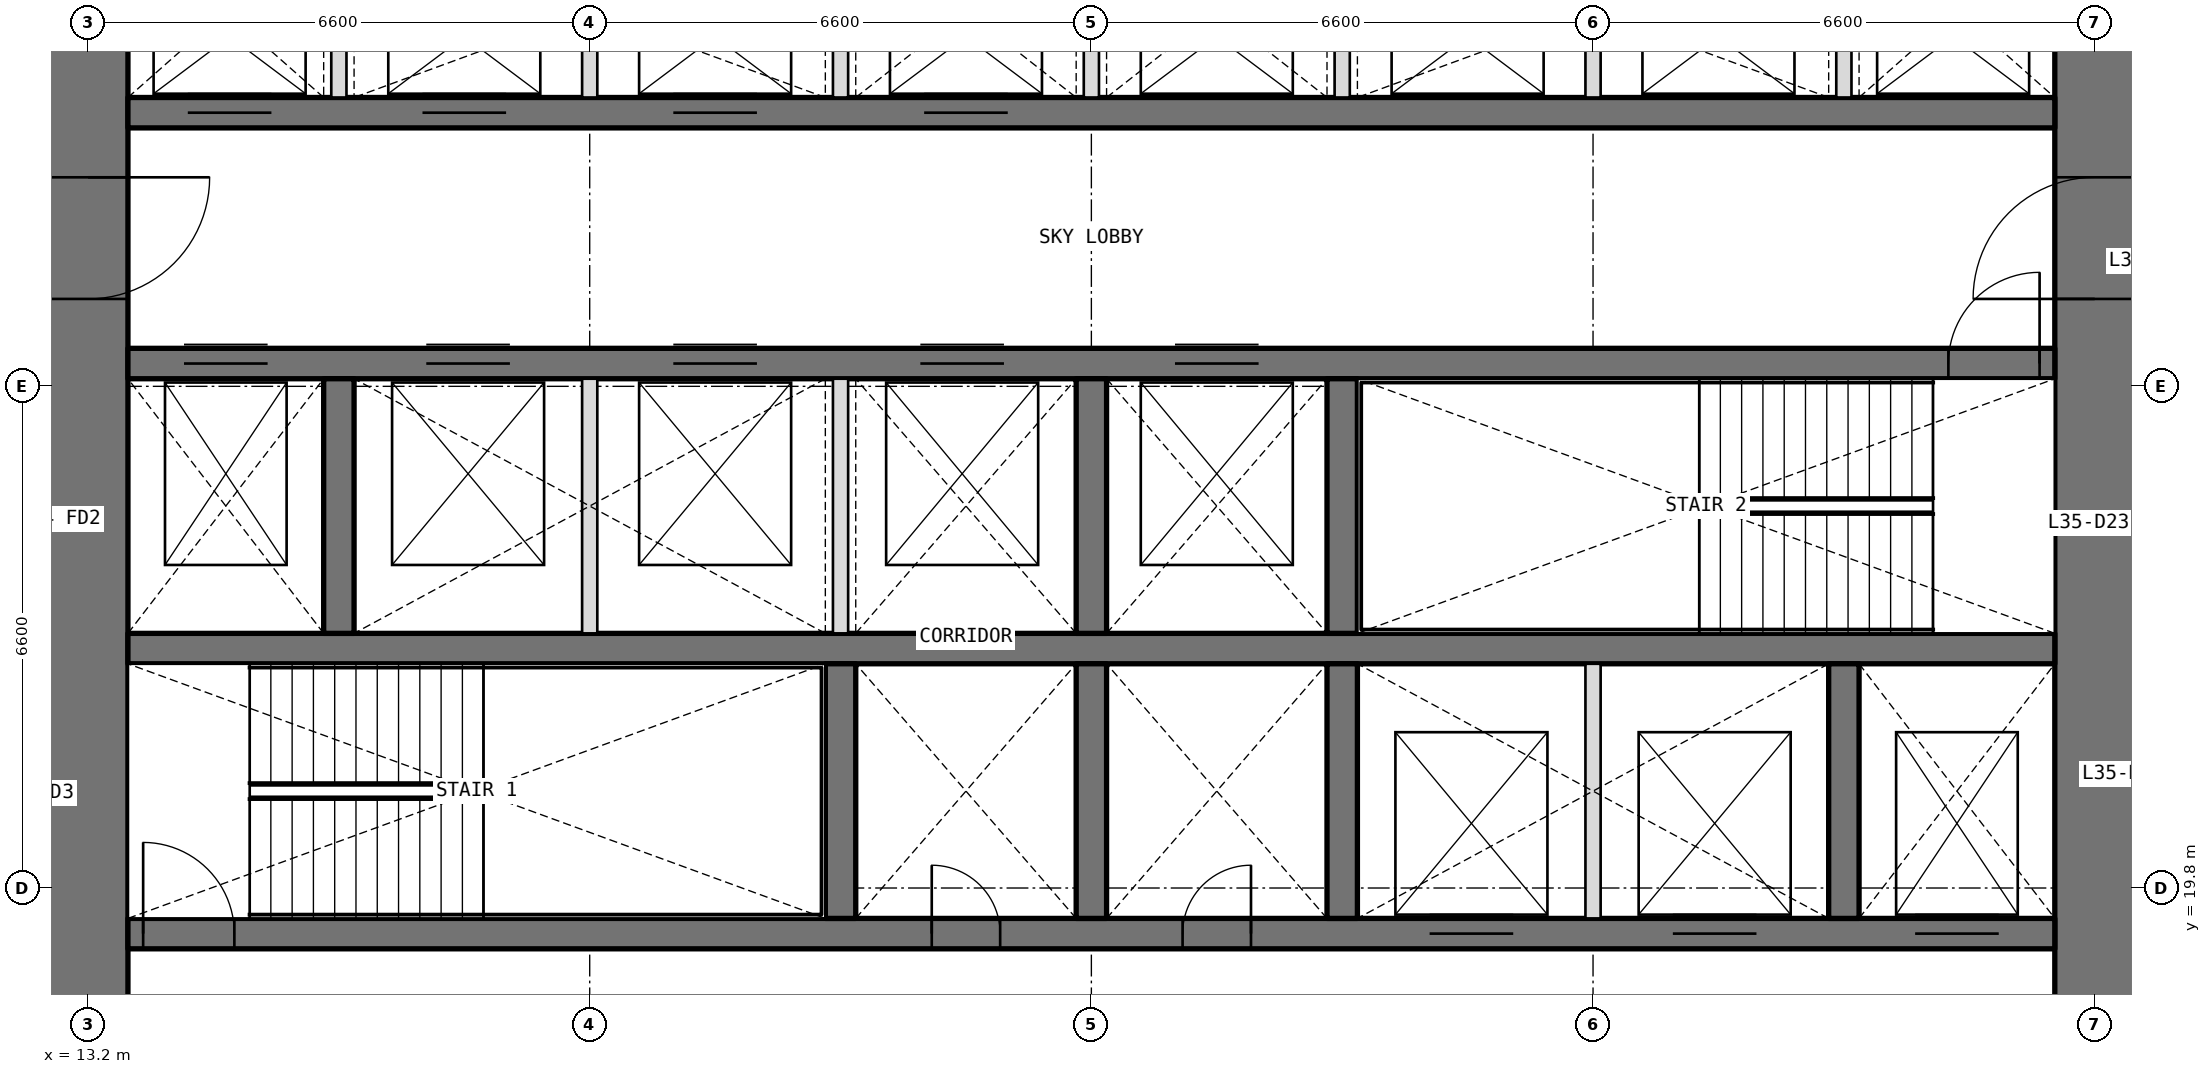
"""IFC4 building model, lengths in metres.
Left out: names, types, materials, properties, quantities, classifications, styles, units other than length and angle.
Written with IfcOpenShell. Run it as: python <this file> out.ifc"""

import sys

from ifc_helpers import new_model, si_unit, direction, frame, frame_2d, origin, place, context, subcontext, project, spatial, rectangle, extrude, element, fill, save


model = new_model("IFC4")
c1 = context("Model", 3, precision=1e-05, world=origin(), true_north=direction((0.0, 1.0)))
c2 = subcontext(c1, "Body", "Model", "MODEL_VIEW")
j1 = project(units=[si_unit("LENGTHUNIT", "METRE"), si_unit("PLANEANGLEUNIT", "RADIAN")], contexts=[c1])
p1 = place(None, origin())
s1 = spatial("IfcSite", under=j1, at=p1, CompositionType="ELEMENT")
p2 = place(p1, origin())
s2 = spatial("IfcBuilding", under=s1, at=p2, CompositionType="ELEMENT")
p3 = place(p2, frame((0.0, 0.0, 155.7)))
s3 = spatial("IfcBuildingStorey", under=s2, at=p3, CompositionType="ELEMENT", Elevation=155.7)
p4 = place(p3, frame((39.6, 13.725, 0.0), z_axis=(0.0, 0.0, 1.0), x_axis=(0.0, 1.0, 0.0)))
e1 = element("IfcWall", 1, at=p4, inside=s3, PredefinedType="SHEAR", context=c2, shape_type="SweptSolid", body=[
    extrude(rectangle(XDim=18.75, YDim=1.05, at=frame_2d((9.375, 0.0))), origin(), (0.0, 0.0, 1.0), 4.2),
])
p5 = place(p4, frame((3.025, 0.0, 0.0)))
e2 = element("IfcOpeningElement", 2, at=p5, cuts=e1, PredefinedType="OPENING", context=c2, shape_type="SweptSolid", body=[
    extrude(rectangle(XDim=1.6, YDim=2.1, at=frame_2d((0.8, 1.05))), frame((0.0, 0.535, 0.0), z_axis=(0.0, -1.0, 0.0), x_axis=(1.0, 0.0, 0.0)), (0.0, 0.0, 1.0), 1.07),
])
p6 = place(p4, frame((13.825, 0.0, 0.0)))
e3 = element("IfcOpeningElement", 3, at=p6, cuts=e1, PredefinedType="OPENING", context=c2, shape_type="SweptSolid", body=[
    extrude(rectangle(XDim=1.6, YDim=2.1, at=frame_2d((0.8, 1.05))), frame((0.0, 0.535, 0.0), z_axis=(0.0, -1.0, 0.0), x_axis=(1.0, 0.0, 0.0)), (0.0, 0.0, 1.0), 1.07),
])
p7 = place(p3, frame((13.2, 32.475, 0.0), z_axis=(0.0, 0.0, 1.0), x_axis=(0.0, -1.0, 0.0)))
e4 = element("IfcWall", 4, at=p7, inside=s3, PredefinedType="SHEAR", context=c2, shape_type="SweptSolid", body=[
    extrude(rectangle(XDim=18.75, YDim=1.05, at=frame_2d((9.375, 0.0))), origin(), (0.0, 0.0, 1.0), 4.2),
])
p8 = place(p7, frame((14.125, 0.0, 0.0)))
e5 = element("IfcOpeningElement", 5, at=p8, cuts=e4, PredefinedType="OPENING", context=c2, shape_type="SweptSolid", body=[
    extrude(rectangle(XDim=1.6, YDim=2.1, at=frame_2d((0.8, 1.05))), frame((0.0, 0.535, 0.0), z_axis=(0.0, -1.0, 0.0), x_axis=(1.0, 0.0, 0.0)), (0.0, 0.0, 1.0), 1.07),
])
p9 = place(p7, frame((3.325, 0.0, 0.0)))
e6 = element("IfcOpeningElement", 6, at=p9, cuts=e4, PredefinedType="OPENING", context=c2, shape_type="SweptSolid", body=[
    extrude(rectangle(XDim=1.6, YDim=2.1, at=frame_2d((0.8, 1.05))), frame((0.0, 0.535, 0.0), z_axis=(0.0, -1.0, 0.0), x_axis=(1.0, 0.0, 0.0)), (0.0, 0.0, 1.0), 1.07),
])
p10 = place(p3, frame((13.725, 19.2, 0.0), z_axis=(0.0, 0.0, 1.0), x_axis=(1.0, 0.0, 0.0)))
e7 = element("IfcWall", 7, at=p10, inside=s3, PredefinedType="SHEAR", context=c2, shape_type="SweptSolid", body=[
    extrude(rectangle(XDim=25.35, YDim=0.4, at=frame_2d((12.675, 0.0))), origin(), (0.0, 0.0, 1.0), 4.2),
])
p11 = place(p10, frame((10.575, 0.0, 0.0)))
e8 = element("IfcOpeningElement", 8, at=p11, cuts=e7, PredefinedType="OPENING", context=c2, shape_type="SweptSolid", body=[
    extrude(rectangle(XDim=0.9, YDim=2.1, at=frame_2d((0.45, 1.05))), frame((0.0, 0.21, 0.0), z_axis=(0.0, -1.0, 0.0), x_axis=(1.0, 0.0, 0.0)), (0.0, 0.0, 1.0), 0.42),
])
p12 = place(p10, frame((13.875, 0.0, 0.0)))
e9 = element("IfcOpeningElement", 9, at=p12, cuts=e7, PredefinedType="OPENING", context=c2, shape_type="SweptSolid", body=[
    extrude(rectangle(XDim=0.9, YDim=2.1, at=frame_2d((0.45, 1.05))), frame((0.0, 0.21, 0.0), z_axis=(0.0, -1.0, 0.0), x_axis=(1.0, 0.0, 0.0)), (0.0, 0.0, 1.0), 0.42),
])
p13 = place(p10, frame((0.2, 0.0, 0.0)))
e10 = element("IfcOpeningElement", 10, at=p13, cuts=e7, PredefinedType="OPENING", context=c2, shape_type="SweptSolid", body=[
    extrude(rectangle(XDim=1.2, YDim=2.1, at=frame_2d((0.6, 1.05))), frame((0.0, 0.21, 0.0), z_axis=(0.0, -1.0, 0.0), x_axis=(1.0, 0.0, 0.0)), (0.0, 0.0, 1.0), 0.42),
])
p14 = place(p10, frame((23.512, 0.0, 0.0)))
e11 = element("IfcOpeningElement", 11, at=p14, cuts=e7, PredefinedType="OPENING", context=c2, shape_type="SweptSolid", body=[
    extrude(rectangle(XDim=1.1, YDim=2.1, at=frame_2d((0.55, 1.05))), frame((0.0, 0.21, 0.0), z_axis=(0.0, -1.0, 0.0), x_axis=(1.0, 0.0, 0.0)), (0.0, 0.0, 1.0), 0.42),
])
p15 = place(p10, frame((17.125, 0.0, 0.0)))
e12 = element("IfcOpeningElement", 12, at=p15, cuts=e7, PredefinedType="OPENING", context=c2, shape_type="SweptSolid", body=[
    extrude(rectangle(XDim=1.1, YDim=2.1, at=frame_2d((0.55, 1.05))), frame((0.0, 0.21, 0.0), z_axis=(0.0, -1.0, 0.0), x_axis=(1.0, 0.0, 0.0)), (0.0, 0.0, 1.0), 0.42),
])
p16 = place(p10, frame((20.325, 0.0, 0.0)))
e13 = element("IfcOpeningElement", 13, at=p16, cuts=e7, PredefinedType="OPENING", context=c2, shape_type="SweptSolid", body=[
    extrude(rectangle(XDim=1.1, YDim=2.1, at=frame_2d((0.55, 1.05))), frame((0.0, 0.21, 0.0), z_axis=(0.0, -1.0, 0.0), x_axis=(1.0, 0.0, 0.0)), (0.0, 0.0, 1.0), 0.42),
])
p17 = place(p3, frame((13.725, 22.95, 0.0), z_axis=(0.0, 0.0, 1.0), x_axis=(1.0, 0.0, 0.0)))
e14 = element("IfcWall", 14, at=p17, inside=s3, PredefinedType="SHEAR", context=c2, shape_type="SweptSolid", body=[
    extrude(rectangle(XDim=25.35, YDim=0.4, at=frame_2d((12.675, 0.0))), origin(), (0.0, 0.0, 1.0), 4.2),
])
p18 = place(p3, frame((13.725, 26.7, 0.0), z_axis=(0.0, 0.0, 1.0), x_axis=(1.0, 0.0, 0.0)))
e15 = element("IfcWall", 15, at=p18, inside=s3, PredefinedType="SHEAR", context=c2, shape_type="SweptSolid", body=[
    extrude(rectangle(XDim=25.35, YDim=0.4, at=frame_2d((12.675, 0.0))), origin(), (0.0, 0.0, 1.0), 4.2),
])
p19 = place(p18, frame((23.95, 0.0, 0.0)))
e16 = element("IfcOpeningElement", 16, at=p19, cuts=e15, PredefinedType="OPENING", context=c2, shape_type="SweptSolid", body=[
    extrude(rectangle(XDim=1.2, YDim=2.1, at=frame_2d((0.6, 1.05))), frame((0.0, 0.21, 0.0), z_axis=(0.0, -1.0, 0.0), x_axis=(1.0, 0.0, 0.0)), (0.0, 0.0, 1.0), 0.42),
])
p20 = place(p18, frame((0.738, 0.0, 0.0)))
e17 = element("IfcOpeningElement", 17, at=p20, cuts=e15, PredefinedType="OPENING", context=c2, shape_type="SweptSolid", body=[
    extrude(rectangle(XDim=1.1, YDim=2.1, at=frame_2d((0.55, 1.05))), frame((0.0, 0.21, 0.0), z_axis=(0.0, -1.0, 0.0), x_axis=(1.0, 0.0, 0.0)), (0.0, 0.0, 1.0), 0.42),
])
p21 = place(p18, frame((3.925, 0.0, 0.0)))
e18 = element("IfcOpeningElement", 18, at=p21, cuts=e15, PredefinedType="OPENING", context=c2, shape_type="SweptSolid", body=[
    extrude(rectangle(XDim=1.1, YDim=2.1, at=frame_2d((0.55, 1.05))), frame((0.0, 0.21, 0.0), z_axis=(0.0, -1.0, 0.0), x_axis=(1.0, 0.0, 0.0)), (0.0, 0.0, 1.0), 0.42),
])
p22 = place(p18, frame((7.175, 0.0, 0.0)))
e19 = element("IfcOpeningElement", 19, at=p22, cuts=e15, PredefinedType="OPENING", context=c2, shape_type="SweptSolid", body=[
    extrude(rectangle(XDim=1.1, YDim=2.1, at=frame_2d((0.55, 1.05))), frame((0.0, 0.21, 0.0), z_axis=(0.0, -1.0, 0.0), x_axis=(1.0, 0.0, 0.0)), (0.0, 0.0, 1.0), 0.42),
])
p23 = place(p18, frame((10.425, 0.0, 0.0)))
e20 = element("IfcOpeningElement", 20, at=p23, cuts=e15, PredefinedType="OPENING", context=c2, shape_type="SweptSolid", body=[
    extrude(rectangle(XDim=1.1, YDim=2.1, at=frame_2d((0.55, 1.05))), frame((0.0, 0.21, 0.0), z_axis=(0.0, -1.0, 0.0), x_axis=(1.0, 0.0, 0.0)), (0.0, 0.0, 1.0), 0.42),
])
p24 = place(p18, frame((13.775, 0.0, 0.0)))
e21 = element("IfcOpeningElement", 21, at=p24, cuts=e15, PredefinedType="OPENING", context=c2, shape_type="SweptSolid", body=[
    extrude(rectangle(XDim=1.1, YDim=2.1, at=frame_2d((0.55, 1.05))), frame((0.0, 0.21, 0.0), z_axis=(0.0, -1.0, 0.0), x_axis=(1.0, 0.0, 0.0)), (0.0, 0.0, 1.0), 0.42),
])
p25 = place(p3, frame((13.725, 30.0, 0.0), z_axis=(0.0, 0.0, 1.0), x_axis=(1.0, 0.0, 0.0)))
e22 = element("IfcWall", 22, at=p25, inside=s3, PredefinedType="SHEAR", context=c2, shape_type="SweptSolid", body=[
    extrude(rectangle(XDim=25.35, YDim=0.4, at=frame_2d((12.675, 0.0))), origin(), (0.0, 0.0, 1.0), 4.2),
])
p26 = place(p25, frame((0.788, 0.0, 0.0)))
e23 = element("IfcOpeningElement", 23, at=p26, cuts=e22, PredefinedType="OPENING", context=c2, shape_type="SweptSolid", body=[
    extrude(rectangle(XDim=1.1, YDim=2.1, at=frame_2d((0.55, 1.05))), frame((0.0, 0.21, 0.0), z_axis=(0.0, -1.0, 0.0), x_axis=(1.0, 0.0, 0.0)), (0.0, 0.0, 1.0), 0.42),
])
p27 = place(p25, frame((3.875, 0.0, 0.0)))
e24 = element("IfcOpeningElement", 24, at=p27, cuts=e22, PredefinedType="OPENING", context=c2, shape_type="SweptSolid", body=[
    extrude(rectangle(XDim=1.1, YDim=2.1, at=frame_2d((0.55, 1.05))), frame((0.0, 0.21, 0.0), z_axis=(0.0, -1.0, 0.0), x_axis=(1.0, 0.0, 0.0)), (0.0, 0.0, 1.0), 0.42),
])
p28 = place(p25, frame((7.175, 0.0, 0.0)))
e25 = element("IfcOpeningElement", 25, at=p28, cuts=e22, PredefinedType="OPENING", context=c2, shape_type="SweptSolid", body=[
    extrude(rectangle(XDim=1.1, YDim=2.1, at=frame_2d((0.55, 1.05))), frame((0.0, 0.21, 0.0), z_axis=(0.0, -1.0, 0.0), x_axis=(1.0, 0.0, 0.0)), (0.0, 0.0, 1.0), 0.42),
])
p29 = place(p25, frame((10.475, 0.0, 0.0)))
e26 = element("IfcOpeningElement", 26, at=p29, cuts=e22, PredefinedType="OPENING", context=c2, shape_type="SweptSolid", body=[
    extrude(rectangle(XDim=1.1, YDim=2.1, at=frame_2d((0.55, 1.05))), frame((0.0, 0.21, 0.0), z_axis=(0.0, -1.0, 0.0), x_axis=(1.0, 0.0, 0.0)), (0.0, 0.0, 1.0), 0.42),
])
for number, where, z_axis, x_axis in (
    (27, (23.1, 19.4, 0.0), (0.0, 0.0, 1.0), (0.0, 1.0, 0.0)),
    (28, (26.4, 19.4, 0.0), (0.0, 0.0, 1.0), (0.0, 1.0, 0.0)),
    (29, (29.7, 19.4, 0.0), (0.0, 0.0, 1.0), (0.0, 1.0, 0.0)),
    (30, (36.3, 19.4, 0.0), (0.0, 0.0, 1.0), (0.0, 1.0, 0.0)),
    (31, (16.5, 23.15, 0.0), (0.0, 0.0, 1.0), (0.0, 1.0, 0.0)),
    (32, (26.4, 23.15, 0.0), (0.0, 0.0, 1.0), (0.0, 1.0, 0.0)),
    (33, (29.7, 23.15, 0.0), (0.0, 0.0, 1.0), (0.0, 1.0, 0.0)),
):
    element("IfcWall", number, at=place(p3, frame(where, z_axis=z_axis, x_axis=x_axis)), inside=s3, PredefinedType="SHEAR", context=c2, shape_type="SweptSolid", body=[
        extrude(rectangle(XDim=3.35, YDim=0.4, at=frame_2d((1.675, 0.0))), origin(), (0.0, 0.0, 1.0), 4.2),
    ])
for number, where, z_axis, x_axis in (
    (34, (16.5, 30.2, 0.0), (0.0, 0.0, 1.0), (0.0, 1.0, 0.0)),
    (35, (19.8, 30.2, 0.0), (0.0, 0.0, 1.0), (0.0, 1.0, 0.0)),
    (36, (23.1, 30.2, 0.0), (0.0, 0.0, 1.0), (0.0, 1.0, 0.0)),
    (37, (26.4, 30.2, 0.0), (0.0, 0.0, 1.0), (0.0, 1.0, 0.0)),
    (38, (29.7, 30.2, 0.0), (0.0, 0.0, 1.0), (0.0, 1.0, 0.0)),
    (39, (33.0, 30.2, 0.0), (0.0, 0.0, 1.0), (0.0, 1.0, 0.0)),
    (40, (36.3, 30.2, 0.0), (0.0, 0.0, 1.0), (0.0, 1.0, 0.0)),
):
    element("IfcWall", number, at=place(p3, frame(where, z_axis=z_axis, x_axis=x_axis)), inside=s3, PredefinedType="PARTITIONING", context=c2, shape_type="SweptSolid", body=[
        extrude(rectangle(XDim=2.275, YDim=0.2, at=frame_2d((1.138, 0.0))), origin(), (0.0, 0.0, 1.0), 4.2),
    ])
for number, where, z_axis, x_axis in (
    (41, (33.0, 19.4, 0.0), (0.0, 0.0, 1.0), (0.0, 1.0, 0.0)),
    (42, (19.8, 23.15, 0.0), (0.0, 0.0, 1.0), (0.0, 1.0, 0.0)),
    (43, (23.1, 23.15, 0.0), (0.0, 0.0, 1.0), (0.0, 1.0, 0.0)),
):
    element("IfcWall", number, at=place(p3, frame(where, z_axis=z_axis, x_axis=x_axis)), inside=s3, PredefinedType="PARTITIONING", context=c2, shape_type="SweptSolid", body=[
        extrude(rectangle(XDim=3.35, YDim=0.2, at=frame_2d((1.675, 0.0))), origin(), (0.0, 0.0, 1.0), 4.2),
    ])
p30 = place(p11, origin())
e44 = element("IfcDoor", 44, at=p30, inside=s3, OperationType="SINGLE_SWING_LEFT", PredefinedType="DOOR", context=c2, shape_type="SweptSolid", body=[
    extrude(rectangle(XDim=0.9, YDim=2.1, at=frame_2d((0.45, 1.05))), frame((0.0, 0.025, 0.0), z_axis=(0.0, -1.0, 0.0), x_axis=(1.0, 0.0, 0.0)), (0.0, 0.0, 1.0), 0.05),
])
fill(e8, e44)
p31 = place(p12, origin())
e45 = element("IfcDoor", 45, at=p31, inside=s3, OperationType="SINGLE_SWING_RIGHT", PredefinedType="DOOR", context=c2, shape_type="SweptSolid", body=[
    extrude(rectangle(XDim=0.9, YDim=2.1, at=frame_2d((0.45, 1.05))), frame((0.0, 0.025, 0.0), z_axis=(0.0, -1.0, 0.0), x_axis=(1.0, 0.0, 0.0)), (0.0, 0.0, 1.0), 0.05),
])
fill(e9, e45)
p32 = place(p13, origin())
e46 = element("IfcDoor", 46, at=p32, inside=s3, OperationType="SINGLE_SWING_LEFT", PredefinedType="DOOR", context=c2, shape_type="SweptSolid", body=[
    extrude(rectangle(XDim=1.2, YDim=2.1, at=frame_2d((0.6, 1.05))), frame((0.0, 0.025, 0.0), z_axis=(0.0, -1.0, 0.0), x_axis=(1.0, 0.0, 0.0)), (0.0, 0.0, 1.0), 0.05),
])
fill(e10, e46)
p33 = place(p19, origin())
e47 = element("IfcDoor", 47, at=p33, inside=s3, OperationType="SINGLE_SWING_RIGHT", PredefinedType="DOOR", context=c2, shape_type="SweptSolid", body=[
    extrude(rectangle(XDim=1.2, YDim=2.1, at=frame_2d((0.6, 1.05))), frame((0.0, 0.025, 0.0), z_axis=(0.0, -1.0, 0.0), x_axis=(1.0, 0.0, 0.0)), (0.0, 0.0, 1.0), 0.05),
])
fill(e16, e47)
p34 = place(p9, origin())
e48 = element("IfcDoor", 48, at=p34, inside=s3, OperationType="DOUBLE_DOOR_DOUBLE_SWING", PredefinedType="DOOR", context=c2, shape_type="SweptSolid", body=[
    extrude(rectangle(XDim=1.6, YDim=2.1, at=frame_2d((0.8, 1.05))), frame((0.0, 0.025, 0.0), z_axis=(0.0, -1.0, 0.0), x_axis=(1.0, 0.0, 0.0)), (0.0, 0.0, 1.0), 0.05),
])
fill(e6, e48)
p35 = place(p6, origin())
e49 = element("IfcDoor", 49, at=p35, inside=s3, OperationType="DOUBLE_DOOR_DOUBLE_SWING", PredefinedType="DOOR", context=c2, shape_type="SweptSolid", body=[
    extrude(rectangle(XDim=1.6, YDim=2.1, at=frame_2d((0.8, 1.05))), frame((0.0, 0.025, 0.0), z_axis=(0.0, -1.0, 0.0), x_axis=(1.0, 0.0, 0.0)), (0.0, 0.0, 1.0), 0.05),
])
fill(e3, e49)
p36 = place(p26, origin())
e50 = element("IfcDoor", 50, at=p36, inside=s3, OperationType="DOUBLE_DOOR_SLIDING", PredefinedType="DOOR", context=c2, shape_type="SweptSolid", body=[
    extrude(rectangle(XDim=1.1, YDim=2.1, at=frame_2d((0.55, 1.05))), frame((0.0, 0.025, 0.0), z_axis=(0.0, -1.0, 0.0), x_axis=(1.0, 0.0, 0.0)), (0.0, 0.0, 1.0), 0.05),
])
fill(e23, e50)
p37 = place(p27, origin())
e51 = element("IfcDoor", 51, at=p37, inside=s3, OperationType="DOUBLE_DOOR_SLIDING", PredefinedType="DOOR", context=c2, shape_type="SweptSolid", body=[
    extrude(rectangle(XDim=1.1, YDim=2.1, at=frame_2d((0.55, 1.05))), frame((0.0, 0.025, 0.0), z_axis=(0.0, -1.0, 0.0), x_axis=(1.0, 0.0, 0.0)), (0.0, 0.0, 1.0), 0.05),
])
fill(e24, e51)
p38 = place(p28, origin())
e52 = element("IfcDoor", 52, at=p38, inside=s3, OperationType="DOUBLE_DOOR_SLIDING", PredefinedType="DOOR", context=c2, shape_type="SweptSolid", body=[
    extrude(rectangle(XDim=1.1, YDim=2.1, at=frame_2d((0.55, 1.05))), frame((0.0, 0.025, 0.0), z_axis=(0.0, -1.0, 0.0), x_axis=(1.0, 0.0, 0.0)), (0.0, 0.0, 1.0), 0.05),
])
fill(e25, e52)
p39 = place(p29, origin())
e53 = element("IfcDoor", 53, at=p39, inside=s3, OperationType="DOUBLE_DOOR_SLIDING", PredefinedType="DOOR", context=c2, shape_type="SweptSolid", body=[
    extrude(rectangle(XDim=1.1, YDim=2.1, at=frame_2d((0.55, 1.05))), frame((0.0, 0.025, 0.0), z_axis=(0.0, -1.0, 0.0), x_axis=(1.0, 0.0, 0.0)), (0.0, 0.0, 1.0), 0.05),
])
fill(e26, e53)
p40 = place(p20, origin())
e54 = element("IfcDoor", 54, at=p40, inside=s3, OperationType="DOUBLE_DOOR_SLIDING", PredefinedType="DOOR", context=c2, shape_type="SweptSolid", body=[
    extrude(rectangle(XDim=1.1, YDim=2.1, at=frame_2d((0.55, 1.05))), frame((0.0, 0.025, 0.0), z_axis=(0.0, -1.0, 0.0), x_axis=(1.0, 0.0, 0.0)), (0.0, 0.0, 1.0), 0.05),
])
fill(e17, e54)
p41 = place(p14, origin())
e55 = element("IfcDoor", 55, at=p41, inside=s3, OperationType="DOUBLE_DOOR_SLIDING", PredefinedType="DOOR", context=c2, shape_type="SweptSolid", body=[
    extrude(rectangle(XDim=1.1, YDim=2.1, at=frame_2d((0.55, 1.05))), frame((0.0, 0.025, 0.0), z_axis=(0.0, -1.0, 0.0), x_axis=(1.0, 0.0, 0.0)), (0.0, 0.0, 1.0), 0.05),
])
fill(e11, e55)
p42 = place(p15, origin())
e56 = element("IfcDoor", 56, at=p42, inside=s3, OperationType="DOUBLE_DOOR_SLIDING", PredefinedType="DOOR", context=c2, shape_type="SweptSolid", body=[
    extrude(rectangle(XDim=1.1, YDim=2.1, at=frame_2d((0.55, 1.05))), frame((0.0, 0.025, 0.0), z_axis=(0.0, -1.0, 0.0), x_axis=(1.0, 0.0, 0.0)), (0.0, 0.0, 1.0), 0.05),
])
fill(e12, e56)
p43 = place(p16, origin())
e57 = element("IfcDoor", 57, at=p43, inside=s3, OperationType="DOUBLE_DOOR_SLIDING", PredefinedType="DOOR", context=c2, shape_type="SweptSolid", body=[
    extrude(rectangle(XDim=1.1, YDim=2.1, at=frame_2d((0.55, 1.05))), frame((0.0, 0.025, 0.0), z_axis=(0.0, -1.0, 0.0), x_axis=(1.0, 0.0, 0.0)), (0.0, 0.0, 1.0), 0.05),
])
fill(e13, e57)
p44 = place(p21, origin())
e58 = element("IfcDoor", 58, at=p44, inside=s3, OperationType="DOUBLE_DOOR_SLIDING", PredefinedType="DOOR", context=c2, shape_type="SweptSolid", body=[
    extrude(rectangle(XDim=1.1, YDim=2.1, at=frame_2d((0.55, 1.05))), frame((0.0, 0.025, 0.0), z_axis=(0.0, -1.0, 0.0), x_axis=(1.0, 0.0, 0.0)), (0.0, 0.0, 1.0), 0.05),
])
fill(e18, e58)
p45 = place(p22, origin())
e59 = element("IfcDoor", 59, at=p45, inside=s3, OperationType="DOUBLE_DOOR_SLIDING", PredefinedType="DOOR", context=c2, shape_type="SweptSolid", body=[
    extrude(rectangle(XDim=1.1, YDim=2.1, at=frame_2d((0.55, 1.05))), frame((0.0, 0.025, 0.0), z_axis=(0.0, -1.0, 0.0), x_axis=(1.0, 0.0, 0.0)), (0.0, 0.0, 1.0), 0.05),
])
fill(e19, e59)
p46 = place(p23, origin())
e60 = element("IfcDoor", 60, at=p46, inside=s3, OperationType="DOUBLE_DOOR_SLIDING", PredefinedType="DOOR", context=c2, shape_type="SweptSolid", body=[
    extrude(rectangle(XDim=1.1, YDim=2.1, at=frame_2d((0.55, 1.05))), frame((0.0, 0.025, 0.0), z_axis=(0.0, -1.0, 0.0), x_axis=(1.0, 0.0, 0.0)), (0.0, 0.0, 1.0), 0.05),
])
fill(e20, e60)
p47 = place(p24, origin())
e61 = element("IfcDoor", 61, at=p47, inside=s3, OperationType="DOUBLE_DOOR_SLIDING", PredefinedType="DOOR", context=c2, shape_type="SweptSolid", body=[
    extrude(rectangle(XDim=1.1, YDim=2.1, at=frame_2d((0.55, 1.05))), frame((0.0, 0.025, 0.0), z_axis=(0.0, -1.0, 0.0), x_axis=(1.0, 0.0, 0.0)), (0.0, 0.0, 1.0), 0.05),
])
fill(e21, e61)
save(model, sys.argv[1])
